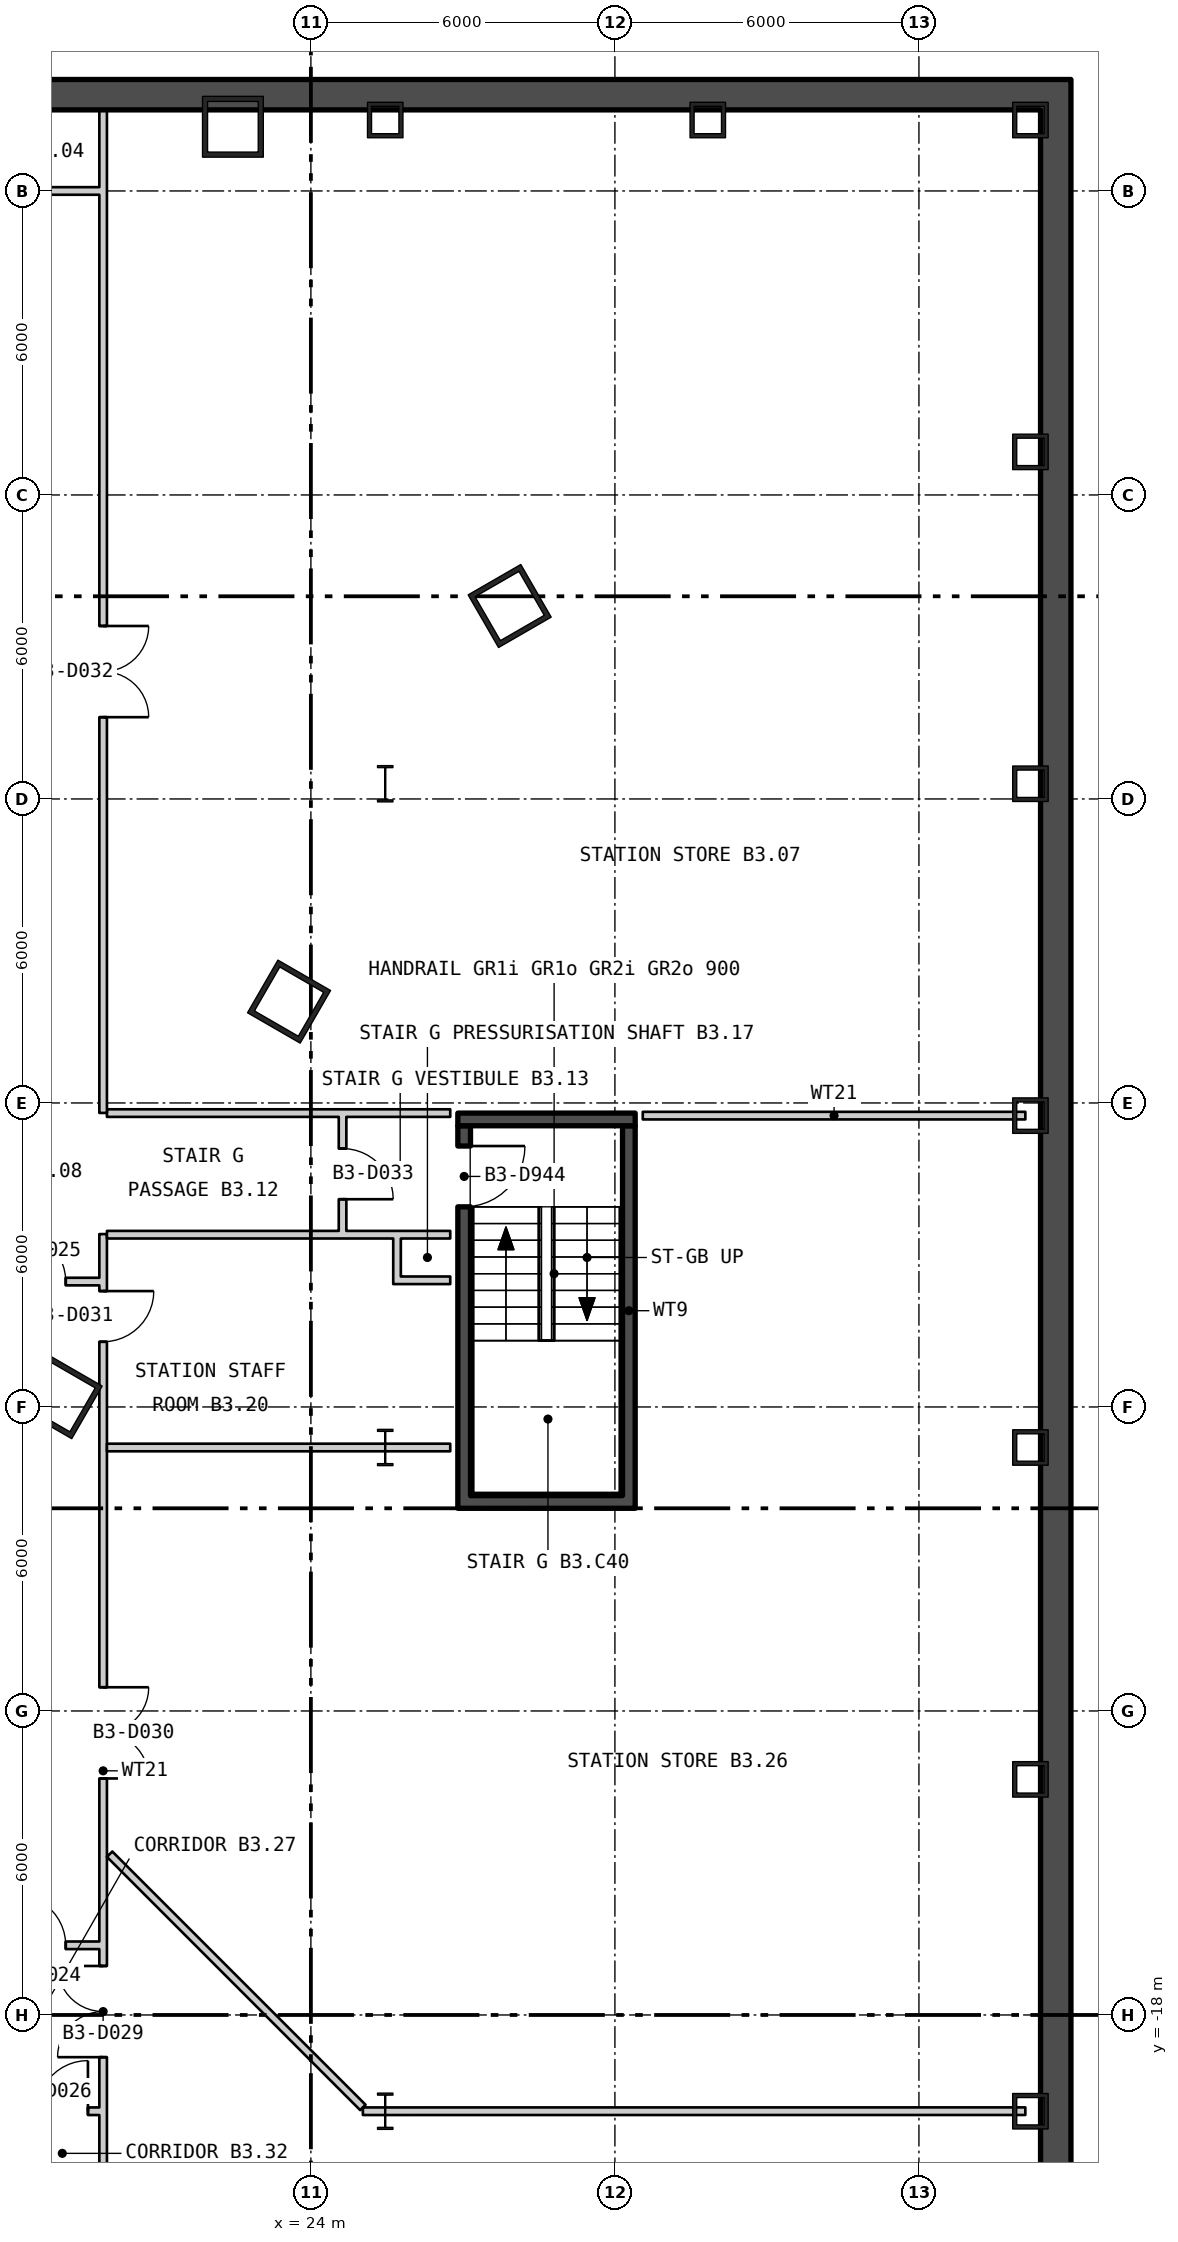
"""IFC4 building model, lengths in metres.
Left out: names, types, materials, properties, quantities, classifications, styles, units other than length and angle.
Written with IfcOpenShell. Run it as: python <this file> out.ifc"""

import sys

from ifc_helpers import new_model, si_unit, direction, frame, frame_2d, origin, origin_2d, place, context, subcontext, project, spatial, rectangle, hollow_rectangle, i_section, extrude, element, fill, save


model = new_model("IFC4")
c1 = context("Model", 3, precision=1e-05, world=origin(), true_north=direction((0.0, 1.0)))
c2 = subcontext(c1, "Body", "Model", "MODEL_VIEW")
j1 = project(units=[si_unit("LENGTHUNIT", "METRE"), si_unit("PLANEANGLEUNIT", "RADIAN")], contexts=[c1])
p1 = place(None, origin())
s1 = spatial("IfcSite", under=j1, at=p1, CompositionType="ELEMENT")
p2 = place(p1, origin())
s2 = spatial("IfcBuilding", under=s1, at=p2, CompositionType="ELEMENT")
p3 = place(p2, frame((0.0, 0.0, -16.8)))
s3 = spatial("IfcBuildingStorey", under=s2, at=p3, CompositionType="ELEMENT", Elevation=-16.8)
for number, where, z_axis, x_axis in (
    (1, (22.461, 19.267, 0.0), (0.0, 0.0, 1.0), (-1.0, 0.0, 0.0)),
    (2, (19.061, -5.807, 0.0), (0.0, 0.0, 1.0), (0.5, 0.866, 0.0)),
    (3, (23.569, 2.0, 0.0), (0.0, 0.0, 1.0), (0.5, 0.866, 0.0)),
    (4, (27.923, 9.808, 0.0), (0.0, 0.0, 1.0), (-0.5, 0.866, 0.0)),
):
    element("IfcColumn", number, at=place(p3, frame(where, z_axis=z_axis, x_axis=x_axis)), inside=s3, PredefinedType="COLUMN", context=c2, shape_type="SweptSolid", body=[
        extrude(hollow_rectangle(XDim=1.2, YDim=1.2, WallThickness=0.1, at=origin_2d()), origin(), (0.0, 0.0, 1.0), 5.4),
    ])
for number, where, z_axis, x_axis in (
    (5, (38.2, -19.9, 0.0), (0.0, 0.0, 1.0), (0.0, 1.0, 0.0)),
    (6, (38.2, -13.35, 0.0), (0.0, 0.0, 1.0), (0.0, 1.0, 0.0)),
    (7, (38.2, -6.8, 0.0), (0.0, 0.0, 1.0), (0.0, 1.0, 0.0)),
    (8, (38.2, -0.25, 0.0), (0.0, 0.0, 1.0), (0.0, 1.0, 0.0)),
    (9, (38.2, 6.3, 0.0), (0.0, 0.0, 1.0), (0.0, 1.0, 0.0)),
    (10, (38.2, 12.85, 0.0), (0.0, 0.0, 1.0), (0.0, 1.0, 0.0)),
    (11, (38.2, 19.4, 0.0), (0.0, 0.0, 1.0), (-1.0, 0.0, 0.0)),
    (12, (31.833, 19.4, 0.0), (0.0, 0.0, 1.0), (-1.0, 0.0, 0.0)),
    (13, (25.467, 19.4, 0.0), (0.0, 0.0, 1.0), (-1.0, 0.0, 0.0)),
):
    element("IfcColumn", number, at=place(p3, frame(where, z_axis=z_axis, x_axis=x_axis)), inside=s3, PredefinedType="COLUMN", context=c2, shape_type="SweptSolid", body=[
        extrude(hollow_rectangle(XDim=0.7, YDim=0.7, WallThickness=0.08, at=origin_2d()), origin(), (0.0, 0.0, 1.0), 5.4),
    ])
for number, where, z_axis, x_axis in (
    (14, (25.467, 6.3, 0.0), (0.0, 0.0, 1.0), (1.0, 0.0, 0.0)),
    (15, (25.467, -6.8, 0.0), (0.0, 0.0, 1.0), (1.0, 0.0, 0.0)),
    (16, (25.467, -19.9, 0.0), (0.0, 0.0, 1.0), (1.0, 0.0, 0.0)),
):
    element("IfcColumn", number, at=place(p3, frame(where, z_axis=z_axis, x_axis=x_axis)), inside=s3, PredefinedType="COLUMN", context=c2, shape_type="SweptSolid", body=[
        extrude(i_section(OverallWidth=0.304, OverallDepth=0.716, WebThickness=0.021, FlangeThickness=0.04, at=origin_2d()), origin(), (0.0, 0.0, 1.0), 5.4),
    ])
p4 = place(p3, frame((-39.0, 19.9, -0.4), z_axis=(0.0, 0.0, 1.0), x_axis=(1.0, 0.0, 0.0)))
e17 = element("IfcWall", 17, at=p4, inside=s3, PredefinedType="STANDARD", context=c2, shape_type="SweptSolid", body=[
    extrude(rectangle(XDim=78.0, YDim=0.6, at=frame_2d((39.0, 0.0))), origin(), (0.0, 0.0, 1.0), 5.4),
])
p5 = place(p3, frame((38.7, -33.2, -0.4), z_axis=(0.0, 0.0, 1.0), x_axis=(0.0, 1.0, 0.0)))
e18 = element("IfcWall", 18, at=p5, inside=s3, PredefinedType="STANDARD", context=c2, shape_type="SweptSolid", body=[
    extrude(rectangle(XDim=52.8, YDim=0.6, at=frame_2d((26.4, 0.0))), origin(), (0.0, 0.0, 1.0), 5.4),
])
p6 = place(p3, frame((27.025, -7.75, 0.0), z_axis=(0.0, 0.0, 1.0), x_axis=(0.0, 1.0, 0.0)))
e19 = element("IfcWall", 19, at=p6, inside=s3, PredefinedType="SHEAR", context=c2, shape_type="SweptSolid", body=[
    extrude(rectangle(XDim=7.3, YDim=0.25, at=frame_2d((3.65, 0.0))), origin(), (0.0, 0.0, 1.0), 4.95),
])
p7 = place(p6, frame((5.7, 0.0, 0.0)))
e20 = element("IfcOpeningElement", 20, at=p7, cuts=e19, PredefinedType="OPENING", context=c2, shape_type="SweptSolid", body=[
    extrude(rectangle(XDim=1.2, YDim=2.1, at=frame_2d((0.6, 1.05))), frame((0.0, 0.135, 0.0), z_axis=(0.0, -1.0, 0.0), x_axis=(1.0, 0.0, 0.0)), (0.0, 0.0, 1.0), 0.27),
])
p8 = place(p3, frame((30.275, -7.75, 0.0), z_axis=(0.0, 0.0, 1.0), x_axis=(0.0, 1.0, 0.0)))
e21 = element("IfcWall", 21, at=p8, inside=s3, PredefinedType="SHEAR", context=c2, shape_type="SweptSolid", body=[
    extrude(rectangle(XDim=7.3, YDim=0.25, at=frame_2d((3.65, 0.0))), origin(), (0.0, 0.0, 1.0), 4.95),
])
for number, where, z_axis, x_axis in (
    (22, (26.9, -7.875, 0.0), (0.0, 0.0, 1.0), (1.0, 0.0, 0.0)),
    (23, (26.9, -0.325, 0.0), (0.0, 0.0, 1.0), (1.0, 0.0, 0.0)),
):
    element("IfcWall", number, at=place(p3, frame(where, z_axis=z_axis, x_axis=x_axis)), inside=s3, PredefinedType="SHEAR", context=c2, shape_type="SweptSolid", body=[
        extrude(rectangle(XDim=3.5, YDim=0.25, at=frame_2d((1.75, 0.0))), origin(), (0.0, 0.0, 1.0), 4.95),
    ])
p9 = place(p3, frame((17.5, -16.625, 0.0), z_axis=(0.0, 0.0, 1.0), x_axis=(1.0, 0.0, 0.0)))
e24 = element("IfcWall", 24, at=p9, inside=s3, PredefinedType="PARTITIONING", context=c2, shape_type="SweptSolid", body=[
    extrude(rectangle(XDim=2.325, YDim=0.15, at=frame_2d((1.163, 0.0))), origin(), (0.0, 0.0, 1.0), 4.95),
])
p10 = place(p9, frame((0.662, 0.0, 0.0)))
e25 = element("IfcOpeningElement", 25, at=p10, cuts=e24, PredefinedType="OPENING", context=c2, shape_type="SweptSolid", body=[
    extrude(rectangle(XDim=1.0, YDim=2.1, at=frame_2d((0.5, 1.05))), frame((0.0, 0.085, 0.0), z_axis=(0.0, -1.0, 0.0), x_axis=(1.0, 0.0, 0.0)), (0.0, 0.0, 1.0), 0.17),
])
p11 = place(p3, frame((17.5, -3.525, 0.0), z_axis=(0.0, 0.0, 1.0), x_axis=(1.0, 0.0, 0.0)))
e26 = element("IfcWall", 26, at=p11, inside=s3, PredefinedType="PARTITIONING", context=c2, shape_type="SweptSolid", body=[
    extrude(rectangle(XDim=2.325, YDim=0.15, at=frame_2d((1.163, 0.0))), origin(), (0.0, 0.0, 1.0), 4.95),
])
p12 = place(p11, frame((0.662, 0.0, 0.0)))
e27 = element("IfcOpeningElement", 27, at=p12, cuts=e26, PredefinedType="OPENING", context=c2, shape_type="SweptSolid", body=[
    extrude(rectangle(XDim=1.0, YDim=2.1, at=frame_2d((0.5, 1.05))), frame((0.0, 0.085, 0.0), z_axis=(0.0, -1.0, 0.0), x_axis=(1.0, 0.0, 0.0)), (0.0, 0.0, 1.0), 0.17),
])
p13 = place(p3, frame((17.5, 18.0, 0.0), z_axis=(0.0, 0.0, 1.0), x_axis=(1.0, 0.0, 0.0)))
e28 = element("IfcWall", 28, at=p13, inside=s3, PredefinedType="PARTITIONING", context=c2, shape_type="SweptSolid", body=[
    extrude(rectangle(XDim=2.475, YDim=0.15, at=frame_2d((1.238, 0.0))), origin(), (0.0, 0.0, 1.0), 4.95),
])
p14 = place(p3, frame((18.375, -19.9, 0.0), z_axis=(0.0, 0.0, 1.0), x_axis=(1.0, 0.0, 0.0)))
e29 = element("IfcWall", 29, at=p14, inside=s3, PredefinedType="PARTITIONING", context=c2, shape_type="SweptSolid", body=[
    extrude(rectangle(XDim=1.45, YDim=0.15, at=frame_2d((0.725, 0.0))), origin(), (0.0, 0.0, 1.0), 4.95),
])
p15 = place(p14, frame((0.225, 0.0, 0.0)))
e30 = element("IfcOpeningElement", 30, at=p15, cuts=e29, PredefinedType="OPENING", context=c2, shape_type="SweptSolid", body=[
    extrude(rectangle(XDim=1.0, YDim=2.1, at=frame_2d((0.5, 1.05))), frame((0.0, 0.085, 0.0), z_axis=(0.0, -1.0, 0.0), x_axis=(1.0, 0.0, 0.0)), (0.0, 0.0, 1.0), 0.17),
])
p16 = place(p3, frame((19.9, -23.775, 0.0), z_axis=(0.0, 0.0, 1.0), x_axis=(0.0, 1.0, 0.0)))
e31 = element("IfcWall", 31, at=p16, inside=s3, PredefinedType="PARTITIONING", context=c2, shape_type="SweptSolid", body=[
    extrude(rectangle(XDim=21.187, YDim=0.15, at=frame_2d((10.594, 0.0))), origin(), (0.0, 0.0, 1.0), 4.95),
])
p17 = place(p16, frame((0.275, 0.0, 0.0)))
e32 = element("IfcOpeningElement", 32, at=p17, cuts=e31, PredefinedType="OPENING", context=c2, shape_type="SweptSolid", body=[
    extrude(rectangle(XDim=1.0, YDim=2.1, at=frame_2d((0.5, 1.05))), frame((0.0, 0.085, 0.0), z_axis=(0.0, -1.0, 0.0), x_axis=(1.0, 0.0, 0.0)), (0.0, 0.0, 1.0), 0.17),
])
p18 = place(p16, frame((4.942, 0.0, 0.0)))
e33 = element("IfcOpeningElement", 33, at=p18, cuts=e31, PredefinedType="OPENING", context=c2, shape_type="SweptSolid", body=[
    extrude(rectangle(XDim=1.8, YDim=2.1, at=frame_2d((0.9, 1.05))), frame((0.0, 0.085, 0.0), z_axis=(0.0, -1.0, 0.0), x_axis=(1.0, 0.0, 0.0)), (0.0, 0.0, 1.0), 0.17),
])
p19 = place(p16, frame((10.443, 0.0, 0.0)))
e34 = element("IfcOpeningElement", 34, at=p19, cuts=e31, PredefinedType="OPENING", context=c2, shape_type="SweptSolid", body=[
    extrude(rectangle(XDim=1.8, YDim=2.1, at=frame_2d((0.9, 1.05))), frame((0.0, 0.085, 0.0), z_axis=(0.0, -1.0, 0.0), x_axis=(1.0, 0.0, 0.0)), (0.0, 0.0, 1.0), 0.17),
])
p20 = place(p16, frame((19.062, 0.0, 0.0)))
e35 = element("IfcOpeningElement", 35, at=p20, cuts=e31, PredefinedType="OPENING", context=c2, shape_type="SweptSolid", body=[
    extrude(rectangle(XDim=1.0, YDim=2.1, at=frame_2d((0.5, 1.05))), frame((0.0, 0.085, 0.0), z_axis=(0.0, -1.0, 0.0), x_axis=(1.0, 0.0, 0.0)), (0.0, 0.0, 1.0), 0.17),
])
p21 = place(p3, frame((19.9, -0.197, 0.0), z_axis=(0.0, 0.0, 1.0), x_axis=(0.0, 1.0, 0.0)))
e36 = element("IfcWall", 36, at=p21, inside=s3, PredefinedType="PARTITIONING", context=c2, shape_type="SweptSolid", body=[
    extrude(rectangle(XDim=18.122, YDim=0.15, at=frame_2d((9.061, 0.0))), origin(), (0.0, 0.0, 1.0), 4.95),
])
p22 = place(p21, frame((7.811, 0.0, 0.0)))
e37 = element("IfcOpeningElement", 37, at=p22, cuts=e36, PredefinedType="OPENING", context=c2, shape_type="SweptSolid", body=[
    extrude(rectangle(XDim=1.8, YDim=2.1, at=frame_2d((0.9, 1.05))), frame((0.0, 0.085, 0.0), z_axis=(0.0, -1.0, 0.0), x_axis=(1.0, 0.0, 0.0)), (0.0, 0.0, 1.0), 0.17),
])
p23 = place(p3, frame((19.9, 18.075, 0.0), z_axis=(0.0, 0.0, 1.0), x_axis=(0.0, 1.0, 0.0)))
e38 = element("IfcWall", 38, at=p23, inside=s3, PredefinedType="PARTITIONING", context=c2, shape_type="SweptSolid", body=[
    extrude(rectangle(XDim=1.675, YDim=0.15, at=frame_2d((0.838, 0.0))), origin(), (0.0, 0.0, 1.0), 4.95),
])
p24 = place(p3, frame((19.975, -6.8, 0.0), z_axis=(0.0, 0.0, 1.0), x_axis=(1.0, 0.0, 0.0)))
e39 = element("IfcWall", 39, at=p24, inside=s3, PredefinedType="PARTITIONING", context=c2, shape_type="SweptSolid", body=[
    extrude(rectangle(XDim=6.775, YDim=0.15, at=frame_2d((3.388, 0.0))), origin(), (0.0, 0.0, 1.0), 4.95),
])
p25 = place(p3, frame((19.975, -2.6, 0.0), z_axis=(0.0, 0.0, 1.0), x_axis=(1.0, 0.0, 0.0)))
e40 = element("IfcWall", 40, at=p25, inside=s3, PredefinedType="PARTITIONING", context=c2, shape_type="SweptSolid", body=[
    extrude(rectangle(XDim=5.713, YDim=0.15, at=frame_2d((2.857, 0.0))), origin(), (0.0, 0.0, 1.0), 4.95),
])
p26 = place(p3, frame((19.975, -0.2, 0.0), z_axis=(0.0, 0.0, 1.0), x_axis=(1.0, 0.0, 0.0)))
e41 = element("IfcWall", 41, at=p26, inside=s3, PredefinedType="PARTITIONING", context=c2, shape_type="SweptSolid", body=[
    extrude(rectangle(XDim=6.775, YDim=0.15, at=frame_2d((3.388, 0.0))), origin(), (0.0, 0.0, 1.0), 4.95),
])
p27 = place(p3, frame((20.028, -14.827, 0.0), z_axis=(0.0, 0.0, 1.0), x_axis=(0.707106781187, -0.707106781187, 0.0)))
e42 = element("IfcWall", 42, at=p27, inside=s3, PredefinedType="PARTITIONING", context=c2, shape_type="SweptSolid", body=[
    extrude(rectangle(XDim=7.068, YDim=0.15, at=frame_2d((3.534, 0.0))), origin(), (0.0, 0.0, 1.0), 4.95),
])
p28 = place(p3, frame((24.625, -2.525, 0.0), z_axis=(0.0, 0.0, 1.0), x_axis=(0.0, 1.0, 0.0)))
e43 = element("IfcWall", 43, at=p28, inside=s3, PredefinedType="PARTITIONING", context=c2, shape_type="SweptSolid", body=[
    extrude(rectangle(XDim=2.25, YDim=0.15, at=frame_2d((1.125, 0.0))), origin(), (0.0, 0.0, 1.0), 4.95),
])
p29 = place(p28, frame((0.625, 0.0, 0.0)))
e44 = element("IfcOpeningElement", 44, at=p29, cuts=e43, PredefinedType="OPENING", context=c2, shape_type="SweptSolid", body=[
    extrude(rectangle(XDim=1.0, YDim=2.1, at=frame_2d((0.5, 1.05))), frame((0.0, 0.085, 0.0), z_axis=(0.0, -1.0, 0.0), x_axis=(1.0, 0.0, 0.0)), (0.0, 0.0, 1.0), 0.17),
])
p30 = place(p3, frame((25.026, -19.9, 0.0), z_axis=(0.0, 0.0, 1.0), x_axis=(0.999999997075, 7.6487685e-05, 0.0)))
e45 = element("IfcWall", 45, at=p30, inside=s3, PredefinedType="PARTITIONING", context=c2, shape_type="SweptSolid", body=[
    extrude(rectangle(XDim=13.074, YDim=0.15, at=frame_2d((6.537, 0.0))), origin(), (0.0, 0.0, 1.0), 4.95),
])
p31 = place(p3, frame((25.625, -3.5, 0.0), z_axis=(0.0, 0.0, 1.0), x_axis=(1.0, 0.0, 0.0)))
e46 = element("IfcWall", 46, at=p31, inside=s3, PredefinedType="PARTITIONING", context=c2, shape_type="SweptSolid", body=[
    extrude(rectangle(XDim=1.125, YDim=0.15, at=frame_2d((0.562, 0.0))), origin(), (0.0, 0.0, 1.0), 4.95),
])
p32 = place(p3, frame((25.688, -2.6, 0.0), z_axis=(0.0, 0.0, 1.0), x_axis=(1.0, 0.0, 0.0)))
e47 = element("IfcWall", 47, at=p32, inside=s3, PredefinedType="PARTITIONING", context=c2, shape_type="SweptSolid", body=[
    extrude(rectangle(XDim=1.062, YDim=0.15, at=frame_2d((0.531, 0.0))), origin(), (0.0, 0.0, 1.0), 4.95),
])
p33 = place(p3, frame((25.7, -3.425, 0.0), z_axis=(0.0, 0.0, 1.0), x_axis=(0.0, 1.0, 0.0)))
e48 = element("IfcWall", 48, at=p33, inside=s3, PredefinedType="PARTITIONING", context=c2, shape_type="SweptSolid", body=[
    extrude(rectangle(XDim=0.75, YDim=0.15, at=frame_2d((0.375, 0.0))), origin(), (0.0, 0.0, 1.0), 4.95),
])
p34 = place(p3, frame((30.55, -0.25, 0.0), z_axis=(0.0, 0.0, 1.0), x_axis=(1.0, 0.0, 0.0)))
e49 = element("IfcWall", 49, at=p34, inside=s3, PredefinedType="PARTITIONING", context=c2, shape_type="SweptSolid", body=[
    extrude(rectangle(XDim=7.55, YDim=0.15, at=frame_2d((3.775, 0.0))), origin(), (0.0, 0.0, 1.0), 4.95),
])
p35 = place(p7, origin())
e50 = element("IfcDoor", 50, at=p35, inside=s3, OperationType="SINGLE_SWING_RIGHT", PredefinedType="DOOR", context=c2, shape_type="SweptSolid", body=[
    extrude(rectangle(XDim=1.2, YDim=2.1, at=frame_2d((0.6, 1.05))), frame((0.0, 0.025, 0.0), z_axis=(0.0, -1.0, 0.0), x_axis=(1.0, 0.0, 0.0)), (0.0, 0.0, 1.0), 0.05),
])
fill(e20, e50)
p36 = place(p10, origin())
e51 = element("IfcDoor", 51, at=p36, inside=s3, OperationType="SINGLE_SWING_RIGHT", PredefinedType="DOOR", context=c2, shape_type="SweptSolid", body=[
    extrude(rectangle(XDim=1.0, YDim=2.1, at=frame_2d((0.5, 1.05))), frame((0.0, 0.025, 0.0), z_axis=(0.0, -1.0, 0.0), x_axis=(1.0, 0.0, 0.0)), (0.0, 0.0, 1.0), 0.05),
])
fill(e25, e51)
p37 = place(p12, origin())
e52 = element("IfcDoor", 52, at=p37, inside=s3, OperationType="SINGLE_SWING_RIGHT", PredefinedType="DOOR", context=c2, shape_type="SweptSolid", body=[
    extrude(rectangle(XDim=1.0, YDim=2.1, at=frame_2d((0.5, 1.05))), frame((0.0, 0.025, 0.0), z_axis=(0.0, -1.0, 0.0), x_axis=(1.0, 0.0, 0.0)), (0.0, 0.0, 1.0), 0.05),
])
fill(e27, e52)
p38 = place(p15, origin())
e53 = element("IfcDoor", 53, at=p38, inside=s3, OperationType="SINGLE_SWING_LEFT", PredefinedType="DOOR", context=c2, shape_type="SweptSolid", body=[
    extrude(rectangle(XDim=1.0, YDim=2.1, at=frame_2d((0.5, 1.05))), frame((0.0, 0.025, 0.0), z_axis=(0.0, -1.0, 0.0), x_axis=(1.0, 0.0, 0.0)), (0.0, 0.0, 1.0), 0.05),
])
fill(e30, e53)
p39 = place(p18, origin())
e54 = element("IfcDoor", 54, at=p39, inside=s3, OperationType="DOUBLE_DOOR_SINGLE_SWING", PredefinedType="DOOR", context=c2, shape_type="SweptSolid", body=[
    extrude(rectangle(XDim=1.8, YDim=2.1, at=frame_2d((0.9, 1.05))), frame((0.0, 0.025, 0.0), z_axis=(0.0, -1.0, 0.0), x_axis=(1.0, 0.0, 0.0)), (0.0, 0.0, 1.0), 0.05),
])
fill(e33, e54)
p40 = place(p19, origin())
e55 = element("IfcDoor", 55, at=p40, inside=s3, OperationType="DOUBLE_DOOR_SINGLE_SWING", PredefinedType="DOOR", context=c2, shape_type="SweptSolid", body=[
    extrude(rectangle(XDim=1.8, YDim=2.1, at=frame_2d((0.9, 1.05))), frame((0.0, 0.025, 0.0), z_axis=(0.0, -1.0, 0.0), x_axis=(1.0, 0.0, 0.0)), (0.0, 0.0, 1.0), 0.05),
])
fill(e34, e55)
p41 = place(p20, origin())
e56 = element("IfcDoor", 56, at=p41, inside=s3, OperationType="SINGLE_SWING_RIGHT", PredefinedType="DOOR", context=c2, shape_type="SweptSolid", body=[
    extrude(rectangle(XDim=1.0, YDim=2.1, at=frame_2d((0.5, 1.05))), frame((0.0, 0.025, 0.0), z_axis=(0.0, -1.0, 0.0), x_axis=(1.0, 0.0, 0.0)), (0.0, 0.0, 1.0), 0.05),
])
fill(e35, e56)
p42 = place(p22, origin())
e57 = element("IfcDoor", 57, at=p42, inside=s3, OperationType="DOUBLE_DOOR_SINGLE_SWING", PredefinedType="DOOR", context=c2, shape_type="SweptSolid", body=[
    extrude(rectangle(XDim=1.8, YDim=2.1, at=frame_2d((0.9, 1.05))), frame((0.0, 0.025, 0.0), z_axis=(0.0, -1.0, 0.0), x_axis=(1.0, 0.0, 0.0)), (0.0, 0.0, 1.0), 0.05),
])
fill(e37, e57)
p43 = place(p29, origin())
e58 = element("IfcDoor", 58, at=p43, inside=s3, OperationType="SINGLE_SWING_LEFT", PredefinedType="DOOR", context=c2, shape_type="SweptSolid", body=[
    extrude(rectangle(XDim=1.0, YDim=2.1, at=frame_2d((0.5, 1.05))), frame((0.0, 0.025, 0.0), z_axis=(0.0, -1.0, 0.0), x_axis=(1.0, 0.0, 0.0)), (0.0, 0.0, 1.0), 0.05),
])
fill(e44, e58)
save(model, sys.argv[1])
